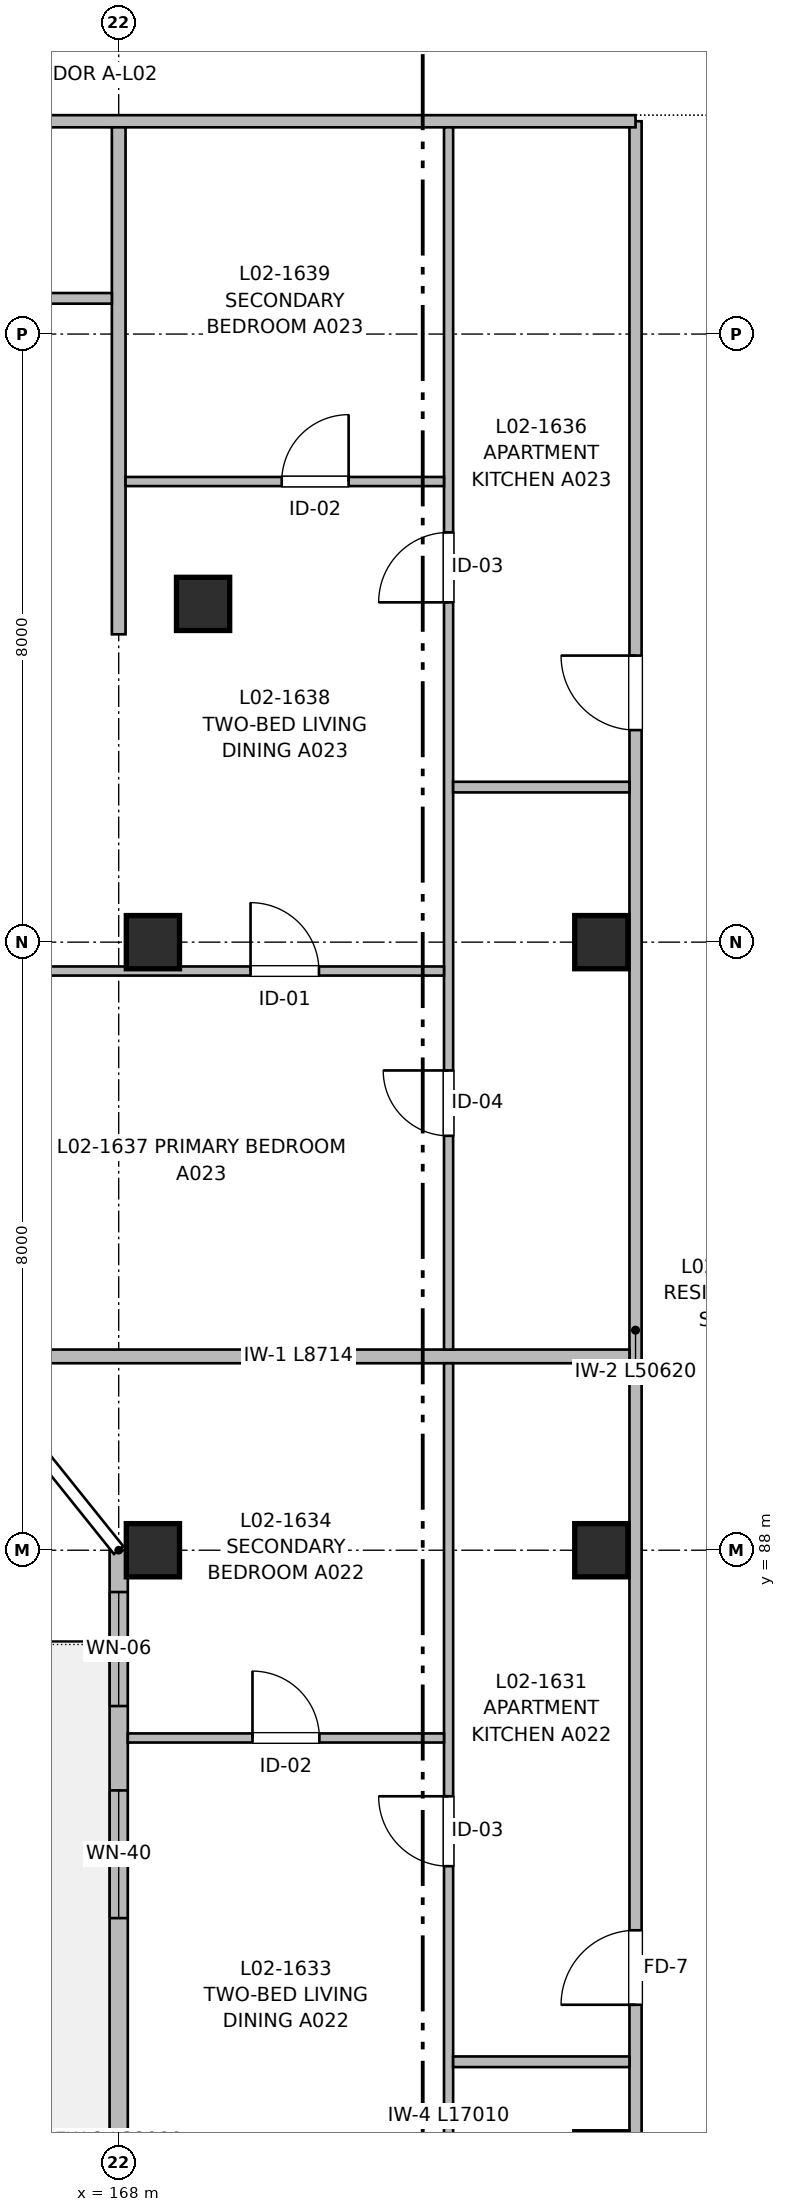
"""IFC4 building model, lengths in metres.
Left out: names, types, materials, properties, quantities, classifications, styles, units other than length and angle.
Written with IfcOpenShell. Run it as: python <this file> out.ifc"""

import sys

from ifc_helpers import new_model, si_unit, direction, frame, frame_2d, origin, origin_2d, place, context, subcontext, project, spatial, rectangle, extrude, element, fill, save


model = new_model("IFC4")
c1 = context("Model", 3, precision=1e-05, world=origin(), true_north=direction((0.0, 1.0)))
c2 = subcontext(c1, "Body", "Model", "MODEL_VIEW")
j1 = project(units=[si_unit("LENGTHUNIT", "METRE"), si_unit("PLANEANGLEUNIT", "RADIAN")], contexts=[c1])
p1 = place(None, origin())
s1 = spatial("IfcSite", under=j1, at=p1, CompositionType="ELEMENT")
p2 = place(p1, origin())
s2 = spatial("IfcBuilding", under=s1, at=p2, CompositionType="ELEMENT")
p3 = place(p2, frame((0.0, 0.0, 7.36)))
s3 = spatial("IfcBuildingStorey", under=s2, at=p3, CompositionType="ELEMENT", Elevation=7.36)
for number, where, z_axis, x_axis in (
    (1, (168.45, 80.0, 0.0), (0.0, 0.0, 1.0), (1.0, 0.0, 0.0)),
    (2, (168.45, 88.0, 0.0), (0.0, 0.0, 1.0), (1.0, 0.0, 0.0)),
    (3, (168.45, 96.0, 0.0), (0.0, 0.0, 1.0), (1.0, 0.0, 0.0)),
    (4, (169.11, 100.45, 0.0), (0.0, 0.0, 1.0), (1.0, 0.0, 0.0)),
    (5, (174.35, 80.0, 0.0), (0.0, 0.0, 1.0), (1.0, 0.0, 0.0)),
    (6, (174.35, 88.0, 0.0), (0.0, 0.0, 1.0), (1.0, 0.0, 0.0)),
    (7, (174.35, 96.0, 0.0), (0.0, 0.0, 1.0), (1.0, 0.0, 0.0)),
):
    element("IfcColumn", number, at=place(p3, frame(where, z_axis=z_axis, x_axis=x_axis)), inside=s3, PredefinedType="COLUMN", context=c2, shape_type="SweptSolid", body=[
        extrude(rectangle(XDim=0.7, YDim=0.7, at=origin_2d()), origin(), (0.0, 0.0, 1.0), 3.2),
    ])
p4 = place(p3, frame((168.0, 56.0, 0.0), z_axis=(0.0, 0.0, 1.0), x_axis=(0.0, 1.0, 0.0)))
e8 = element("IfcWall", 8, at=p4, inside=s3, PredefinedType="SOLIDWALL", context=c2, shape_type="SweptSolid", body=[
    extrude(rectangle(XDim=32.0, YDim=0.24, at=frame_2d((16.0, 0.0))), origin(), (0.0, 0.0, 1.0), 2.98),
])
p5 = place(p4, frame((3.4, 0.0, 0.0)))
e9 = element("IfcOpeningElement", 9, at=p5, cuts=e8, PredefinedType="OPENING", context=c2, shape_type="SweptSolid", body=[
    extrude(rectangle(XDim=1.2, YDim=2.2, at=frame_2d((0.6, 1.1))), frame((0.0, 0.13, 0.0), z_axis=(0.0, -1.0, 0.0), x_axis=(1.0, 0.0, 0.0)), (0.0, 0.0, 1.0), 0.26),
])
p6 = place(p4, frame((10.175, 0.0, 0.72)))
e10 = element("IfcOpeningElement", 10, at=p6, cuts=e8, PredefinedType="OPENING", context=c2, shape_type="SweptSolid", body=[
    extrude(rectangle(XDim=1.95, YDim=1.5, at=frame_2d((0.975, 0.75))), frame((0.0, 0.13, 0.0), z_axis=(0.0, -1.0, 0.0), x_axis=(1.0, 0.0, 0.0)), (0.0, 0.0, 1.0), 0.26),
])
p7 = place(p4, frame((18.7, 0.0, 0.67)))
e11 = element("IfcOpeningElement", 11, at=p7, cuts=e8, PredefinedType="OPENING", context=c2, shape_type="SweptSolid", body=[
    extrude(rectangle(XDim=2.6, YDim=1.55, at=frame_2d((1.3, 0.775))), frame((0.0, 0.13, 0.0), z_axis=(0.0, -1.0, 0.0), x_axis=(1.0, 0.0, 0.0)), (0.0, 0.0, 1.0), 0.26),
])
p8 = place(p4, frame((27.16, 0.0, 0.72)))
e12 = element("IfcOpeningElement", 12, at=p8, cuts=e8, PredefinedType="OPENING", context=c2, shape_type="SweptSolid", body=[
    extrude(rectangle(XDim=1.68, YDim=1.5, at=frame_2d((0.84, 0.75))), frame((0.0, 0.13, 0.0), z_axis=(0.0, -1.0, 0.0), x_axis=(1.0, 0.0, 0.0)), (0.0, 0.0, 1.0), 0.26),
])
p9 = place(p4, frame((14.001, 0.0, 0.82)))
e13 = element("IfcOpeningElement", 13, at=p9, cuts=e8, PredefinedType="OPENING", context=c2, shape_type="SweptSolid", body=[
    extrude(rectangle(XDim=1.5, YDim=1.4, at=frame_2d((0.75, 0.7))), frame((0.0, 0.13, 0.0), z_axis=(0.0, -1.0, 0.0), x_axis=(1.0, 0.0, 0.0)), (0.0, 0.0, 1.0), 0.26),
])
p10 = place(p4, frame((29.95, 0.0, 0.82)))
e14 = element("IfcOpeningElement", 14, at=p10, cuts=e8, PredefinedType="OPENING", context=c2, shape_type="SweptSolid", body=[
    extrude(rectangle(XDim=1.5, YDim=1.4, at=frame_2d((0.75, 0.7))), frame((0.0, 0.13, 0.0), z_axis=(0.0, -1.0, 0.0), x_axis=(1.0, 0.0, 0.0)), (0.0, 0.0, 1.0), 0.26),
])
p11 = place(p3, frame((174.8, 56.18, 0.0), z_axis=(0.0, 0.0, 1.0), x_axis=(0.0, 1.0, 0.0)))
e15 = element("IfcWall", 15, at=p11, inside=s3, PredefinedType="PARTITIONING", context=c2, shape_type="SweptSolid", body=[
    extrude(rectangle(XDim=50.62, YDim=0.16, at=frame_2d((25.31, 0.0))), origin(), (0.0, 0.0, 1.0), 2.935),
])
p12 = place(p11, frame((8.61, 0.0, 0.0)))
e16 = element("IfcOpeningElement", 16, at=p12, cuts=e15, PredefinedType="OPENING", context=c2, shape_type="SweptSolid", body=[
    extrude(rectangle(XDim=0.98, YDim=2.15, at=frame_2d((0.49, 1.075))), frame((0.0, 0.09, 0.0), z_axis=(0.0, -1.0, 0.0), x_axis=(1.0, 0.0, 0.0)), (0.0, 0.0, 1.0), 0.18),
])
p13 = place(p11, frame((25.84, 0.0, 0.0)))
e17 = element("IfcOpeningElement", 17, at=p13, cuts=e15, PredefinedType="OPENING", context=c2, shape_type="SweptSolid", body=[
    extrude(rectangle(XDim=0.98, YDim=2.15, at=frame_2d((0.49, 1.075))), frame((0.0, 0.09, 0.0), z_axis=(0.0, -1.0, 0.0), x_axis=(1.0, 0.0, 0.0)), (0.0, 0.0, 1.0), 0.18),
])
p14 = place(p11, frame((42.61, 0.0, 0.0)))
e18 = element("IfcOpeningElement", 18, at=p14, cuts=e15, PredefinedType="OPENING", context=c2, shape_type="SweptSolid", body=[
    extrude(rectangle(XDim=0.98, YDim=2.15, at=frame_2d((0.49, 1.075))), frame((0.0, 0.09, 0.0), z_axis=(0.0, -1.0, 0.0), x_axis=(1.0, 0.0, 0.0)), (0.0, 0.0, 1.0), 0.18),
])
p15 = place(p3, frame((147.18, 106.8, 0.0), z_axis=(0.0, 0.0, 1.0), x_axis=(1.0, 0.0, 0.0)))
e19 = element("IfcWall", 19, at=p15, inside=s3, PredefinedType="PARTITIONING", context=c2, shape_type="SweptSolid", body=[
    extrude(rectangle(XDim=27.62, YDim=0.16, at=frame_2d((13.81, 0.0))), origin(), (0.0, 0.0, 1.0), 2.935),
])
p16 = place(p15, frame((3.495, 0.0, 0.0)))
e20 = element("IfcOpeningElement", 20, at=p16, cuts=e19, PredefinedType="OPENING", context=c2, shape_type="SweptSolid", body=[
    extrude(rectangle(XDim=1.05, YDim=2.15, at=frame_2d((0.525, 1.075))), frame((0.0, 0.09, 0.0), z_axis=(0.0, -1.0, 0.0), x_axis=(1.0, 0.0, 0.0)), (0.0, 0.0, 1.0), 0.18),
])
p17 = place(p15, frame((10.67, 0.0, 0.0)))
e21 = element("IfcOpeningElement", 21, at=p17, cuts=e19, PredefinedType="OPENING", context=c2, shape_type="SweptSolid", body=[
    extrude(rectangle(XDim=0.98, YDim=2.15, at=frame_2d((0.49, 1.075))), frame((0.0, 0.09, 0.0), z_axis=(0.0, -1.0, 0.0), x_axis=(1.0, 0.0, 0.0)), (0.0, 0.0, 1.0), 0.18),
])
p18 = place(p3, frame((168.0, 100.05, 0.0), z_axis=(0.0, 0.0, 1.0), x_axis=(0.0, 1.0, 0.0)))
e22 = element("IfcWall", 22, at=p18, inside=s3, PredefinedType="PARTITIONING", context=c2, shape_type="SweptSolid", body=[
    extrude(rectangle(XDim=6.67, YDim=0.18, at=frame_2d((3.335, 0.0))), origin(), (0.0, 0.0, 1.0), 2.935),
])
p19 = place(p3, frame((166.006, 90.55, 0.0), z_axis=(0.0, 0.0, 1.0), x_axis=(1.0, 0.0, 0.0)))
e23 = element("IfcWall", 23, at=p19, inside=s3, PredefinedType="PARTITIONING", context=c2, shape_type="SweptSolid", body=[
    extrude(rectangle(XDim=8.714, YDim=0.18, at=frame_2d((4.357, 0.0))), origin(), (0.0, 0.0, 1.0), 2.935),
])
p20 = place(p3, frame((172.34, 73.45, 0.0), z_axis=(0.0, 0.0, 1.0), x_axis=(0.0, 1.0, 0.0)))
e24 = element("IfcWall", 24, at=p20, inside=s3, PredefinedType="PARTITIONING", context=c2, shape_type="SweptSolid", body=[
    extrude(rectangle(XDim=17.01, YDim=0.12, at=frame_2d((8.505, 0.0))), origin(), (0.0, 0.0, 1.0), 2.935),
])
p21 = place(p20, frame((2.972, 0.0, 0.0)))
e25 = element("IfcOpeningElement", 25, at=p21, cuts=e24, PredefinedType="OPENING", context=c2, shape_type="SweptSolid", body=[
    extrude(rectangle(XDim=0.86, YDim=2.1, at=frame_2d((0.43, 1.05))), frame((0.0, 0.07, 0.0), z_axis=(0.0, -1.0, 0.0), x_axis=(1.0, 0.0, 0.0)), (0.0, 0.0, 1.0), 0.14),
])
p22 = place(p20, frame((10.393, 0.0, 0.0)))
e26 = element("IfcOpeningElement", 26, at=p22, cuts=e24, PredefinedType="OPENING", context=c2, shape_type="SweptSolid", body=[
    extrude(rectangle(XDim=0.92, YDim=2.1, at=frame_2d((0.46, 1.05))), frame((0.0, 0.07, 0.0), z_axis=(0.0, -1.0, 0.0), x_axis=(1.0, 0.0, 0.0)), (0.0, 0.0, 1.0), 0.14),
])
p23 = place(p3, frame((172.4, 81.27, 0.0), z_axis=(0.0, 0.0, 1.0), x_axis=(1.0, 0.0, 0.0)))
e27 = element("IfcWall", 27, at=p23, inside=s3, PredefinedType="PARTITIONING", context=c2, shape_type="SweptSolid", body=[
    extrude(rectangle(XDim=2.32, YDim=0.14, at=frame_2d((1.16, 0.0))), origin(), (0.0, 0.0, 1.0), 2.935),
])
p24 = place(p3, frame((168.12, 85.53, 0.0), z_axis=(0.0, 0.0, 1.0), x_axis=(1.0, 0.0, 0.0)))
e28 = element("IfcWall", 28, at=p24, inside=s3, PredefinedType="PARTITIONING", context=c2, shape_type="SweptSolid", body=[
    extrude(rectangle(XDim=4.16, YDim=0.12, at=frame_2d((2.08, 0.0))), origin(), (0.0, 0.0, 1.0), 2.935),
])
p25 = place(p24, frame((1.64, 0.0, 0.0)))
e29 = element("IfcOpeningElement", 29, at=p25, cuts=e28, PredefinedType="OPENING", context=c2, shape_type="SweptSolid", body=[
    extrude(rectangle(XDim=0.88, YDim=2.1, at=frame_2d((0.44, 1.05))), frame((0.0, 0.07, 0.0), z_axis=(0.0, -1.0, 0.0), x_axis=(1.0, 0.0, 0.0)), (0.0, 0.0, 1.0), 0.14),
])
p26 = place(p3, frame((172.34, 90.64, 0.0), z_axis=(0.0, 0.0, 1.0), x_axis=(0.0, 1.0, 0.0)))
e30 = element("IfcWall", 30, at=p26, inside=s3, PredefinedType="PARTITIONING", context=c2, shape_type="SweptSolid", body=[
    extrude(rectangle(XDim=16.08, YDim=0.12, at=frame_2d((8.04, 0.0))), origin(), (0.0, 0.0, 1.0), 2.935),
])
p27 = place(p26, frame((2.812, 0.0, 0.0)))
e31 = element("IfcOpeningElement", 31, at=p27, cuts=e30, PredefinedType="OPENING", context=c2, shape_type="SweptSolid", body=[
    extrude(rectangle(XDim=0.86, YDim=2.1, at=frame_2d((0.43, 1.05))), frame((0.0, 0.07, 0.0), z_axis=(0.0, -1.0, 0.0), x_axis=(1.0, 0.0, 0.0)), (0.0, 0.0, 1.0), 0.14),
])
p28 = place(p26, frame((9.83, 0.0, 0.0)))
e32 = element("IfcOpeningElement", 32, at=p28, cuts=e30, PredefinedType="OPENING", context=c2, shape_type="SweptSolid", body=[
    extrude(rectangle(XDim=0.92, YDim=2.1, at=frame_2d((0.46, 1.05))), frame((0.0, 0.07, 0.0), z_axis=(0.0, -1.0, 0.0), x_axis=(1.0, 0.0, 0.0)), (0.0, 0.0, 1.0), 0.14),
])
p29 = place(p3, frame((172.4, 98.04, 0.0), z_axis=(0.0, 0.0, 1.0), x_axis=(1.0, 0.0, 0.0)))
e33 = element("IfcWall", 33, at=p29, inside=s3, PredefinedType="PARTITIONING", context=c2, shape_type="SweptSolid", body=[
    extrude(rectangle(XDim=2.32, YDim=0.14, at=frame_2d((1.16, 0.0))), origin(), (0.0, 0.0, 1.0), 2.935),
])
p30 = place(p3, frame((161.312, 95.62, 0.0), z_axis=(0.0, 0.0, 1.0), x_axis=(1.0, 0.0, 0.0)))
e34 = element("IfcWall", 34, at=p30, inside=s3, PredefinedType="PARTITIONING", context=c2, shape_type="SweptSolid", body=[
    extrude(rectangle(XDim=10.968, YDim=0.12, at=frame_2d((5.484, 0.0))), origin(), (0.0, 0.0, 1.0), 2.935),
])
p31 = place(p30, frame((8.422, 0.0, 0.0)))
e35 = element("IfcOpeningElement", 35, at=p31, cuts=e34, PredefinedType="OPENING", context=c2, shape_type="SweptSolid", body=[
    extrude(rectangle(XDim=0.9, YDim=2.1, at=frame_2d((0.45, 1.05))), frame((0.0, 0.07, 0.0), z_axis=(0.0, -1.0, 0.0), x_axis=(1.0, 0.0, 0.0)), (0.0, 0.0, 1.0), 0.14),
])
p32 = place(p3, frame((168.09, 102.06, 0.0), z_axis=(0.0, 0.0, 1.0), x_axis=(1.0, 0.0, 0.0)))
e36 = element("IfcWall", 36, at=p32, inside=s3, PredefinedType="PARTITIONING", context=c2, shape_type="SweptSolid", body=[
    extrude(rectangle(XDim=4.19, YDim=0.12, at=frame_2d((2.095, 0.0))), origin(), (0.0, 0.0, 1.0), 2.935),
])
p33 = place(p32, frame((2.055, 0.0, 0.0)))
e37 = element("IfcOpeningElement", 37, at=p33, cuts=e36, PredefinedType="OPENING", context=c2, shape_type="SweptSolid", body=[
    extrude(rectangle(XDim=0.88, YDim=2.1, at=frame_2d((0.44, 1.05))), frame((0.0, 0.07, 0.0), z_axis=(0.0, -1.0, 0.0), x_axis=(1.0, 0.0, 0.0)), (0.0, 0.0, 1.0), 0.14),
])
p34 = place(p3, frame((161.94, 104.47, 0.0), z_axis=(0.0, 0.0, 1.0), x_axis=(1.0, 0.0, 0.0)))
e38 = element("IfcWall", 38, at=p34, inside=s3, PredefinedType="PARTITIONING", context=c2, shape_type="SweptSolid", body=[
    extrude(rectangle(XDim=5.97, YDim=0.14, at=frame_2d((2.985, 0.0))), origin(), (0.0, 0.0, 1.0), 2.935),
])
p35 = place(p34, frame((2.533, 0.0, 0.0)))
e39 = element("IfcOpeningElement", 39, at=p35, cuts=e38, PredefinedType="OPENING", context=c2, shape_type="SweptSolid", body=[
    extrude(rectangle(XDim=0.86, YDim=2.1, at=frame_2d((0.43, 1.05))), frame((0.0, 0.08, 0.0), z_axis=(0.0, -1.0, 0.0), x_axis=(1.0, 0.0, 0.0)), (0.0, 0.0, 1.0), 0.16),
])
p36 = place(p8, origin())
e40 = element("IfcWindow", 40, at=p36, inside=s3, PartitioningType="SINGLE_PANEL", PredefinedType="WINDOW", context=c2, shape_type="SweptSolid", body=[
    extrude(rectangle(XDim=1.68, YDim=1.5, at=frame_2d((0.84, 0.75))), frame((0.0, 0.03, 0.0), z_axis=(0.0, -1.0, 0.0), x_axis=(1.0, 0.0, 0.0)), (0.0, 0.0, 1.0), 0.06),
])
fill(e12, e40)
p37 = place(p22, origin())
e41 = element("IfcDoor", 41, at=p37, inside=s3, OperationType="SINGLE_SWING_RIGHT", PredefinedType="DOOR", context=c2, shape_type="SweptSolid", body=[
    extrude(rectangle(XDim=0.92, YDim=2.1, at=frame_2d((0.46, 1.05))), frame((0.0, 0.025, 0.0), z_axis=(0.0, -1.0, 0.0), x_axis=(1.0, 0.0, 0.0)), (0.0, 0.0, 1.0), 0.05),
])
fill(e26, e41)
p38 = place(p13, origin())
e42 = element("IfcDoor", 42, at=p38, inside=s3, OperationType="SINGLE_SWING_LEFT", PredefinedType="DOOR", context=c2, shape_type="SweptSolid", body=[
    extrude(rectangle(XDim=0.98, YDim=2.15, at=frame_2d((0.49, 1.075))), frame((0.0, 0.025, 0.0), z_axis=(0.0, -1.0, 0.0), x_axis=(1.0, 0.0, 0.0)), (0.0, 0.0, 1.0), 0.05),
])
fill(e17, e42)
p39 = place(p25, origin())
e43 = element("IfcDoor", 43, at=p39, inside=s3, OperationType="SINGLE_SWING_LEFT", PredefinedType="DOOR", context=c2, shape_type="SweptSolid", body=[
    extrude(rectangle(XDim=0.88, YDim=2.1, at=frame_2d((0.44, 1.05))), frame((0.0, 0.025, 0.0), z_axis=(0.0, -1.0, 0.0), x_axis=(1.0, 0.0, 0.0)), (0.0, 0.0, 1.0), 0.05),
])
fill(e29, e43)
p40 = place(p27, origin())
e44 = element("IfcDoor", 44, at=p40, inside=s3, OperationType="SINGLE_SWING_RIGHT", PredefinedType="DOOR", context=c2, shape_type="SweptSolid", body=[
    extrude(rectangle(XDim=0.86, YDim=2.1, at=frame_2d((0.43, 1.05))), frame((0.0, 0.025, 0.0), z_axis=(0.0, -1.0, 0.0), x_axis=(1.0, 0.0, 0.0)), (0.0, 0.0, 1.0), 0.05),
])
fill(e31, e44)
p41 = place(p28, origin())
e45 = element("IfcDoor", 45, at=p41, inside=s3, OperationType="SINGLE_SWING_LEFT", PredefinedType="DOOR", context=c2, shape_type="SweptSolid", body=[
    extrude(rectangle(XDim=0.92, YDim=2.1, at=frame_2d((0.46, 1.05))), frame((0.0, 0.025, 0.0), z_axis=(0.0, -1.0, 0.0), x_axis=(1.0, 0.0, 0.0)), (0.0, 0.0, 1.0), 0.05),
])
fill(e32, e45)
p42 = place(p14, origin())
e46 = element("IfcDoor", 46, at=p42, inside=s3, OperationType="SINGLE_SWING_RIGHT", PredefinedType="DOOR", context=c2, shape_type="SweptSolid", body=[
    extrude(rectangle(XDim=0.98, YDim=2.15, at=frame_2d((0.49, 1.075))), frame((0.0, 0.025, 0.0), z_axis=(0.0, -1.0, 0.0), x_axis=(1.0, 0.0, 0.0)), (0.0, 0.0, 1.0), 0.05),
])
fill(e18, e46)
p43 = place(p31, origin())
e47 = element("IfcDoor", 47, at=p43, inside=s3, OperationType="SINGLE_SWING_LEFT", PredefinedType="DOOR", context=c2, shape_type="SweptSolid", body=[
    extrude(rectangle(XDim=0.9, YDim=2.1, at=frame_2d((0.45, 1.05))), frame((0.0, 0.025, 0.0), z_axis=(0.0, -1.0, 0.0), x_axis=(1.0, 0.0, 0.0)), (0.0, 0.0, 1.0), 0.05),
])
fill(e35, e47)
p44 = place(p33, origin())
e48 = element("IfcDoor", 48, at=p44, inside=s3, OperationType="SINGLE_SWING_RIGHT", PredefinedType="DOOR", context=c2, shape_type="SweptSolid", body=[
    extrude(rectangle(XDim=0.88, YDim=2.1, at=frame_2d((0.44, 1.05))), frame((0.0, 0.025, 0.0), z_axis=(0.0, -1.0, 0.0), x_axis=(1.0, 0.0, 0.0)), (0.0, 0.0, 1.0), 0.05),
])
fill(e37, e48)
p45 = place(p10, origin())
e49 = element("IfcWindow", 49, at=p45, inside=s3, PartitioningType="SINGLE_PANEL", PredefinedType="WINDOW", context=c2, shape_type="SweptSolid", body=[
    extrude(rectangle(XDim=1.5, YDim=1.4, at=frame_2d((0.75, 0.7))), frame((0.0, 0.03, 0.0), z_axis=(0.0, -1.0, 0.0), x_axis=(1.0, 0.0, 0.0)), (0.0, 0.0, 1.0), 0.06),
])
fill(e14, e49)
save(model, sys.argv[1])
